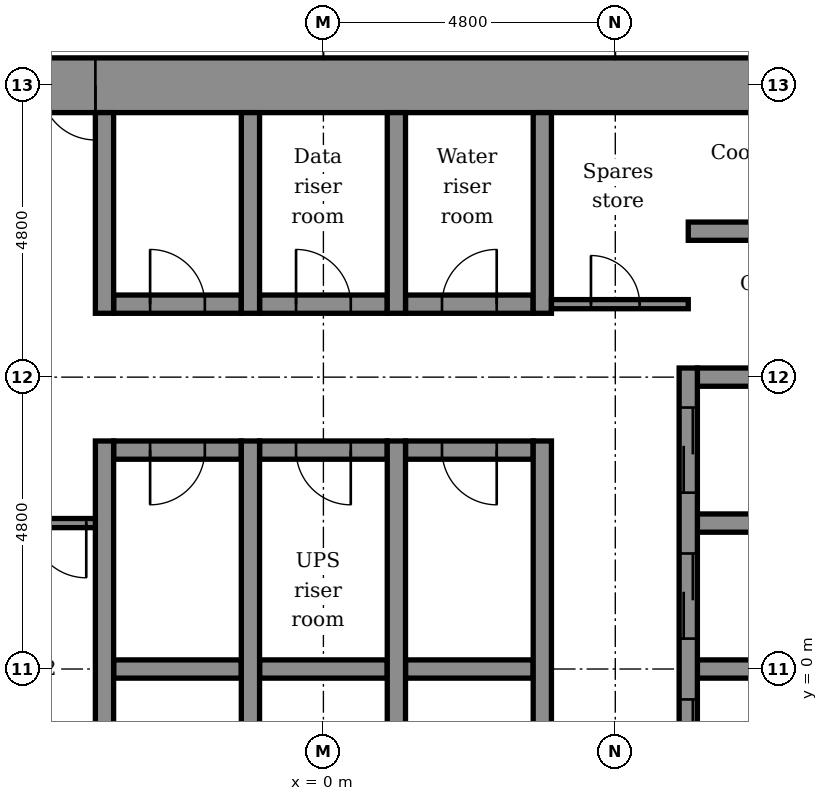
"""IFC4 building model, lengths in metres.
Left out: names, types, materials, properties, quantities, classifications, styles, units other than length and angle.
Written with IfcOpenShell. Run it as: python <this file> out.ifc"""

import sys

from ifc_helpers import new_model, si_unit, direction, frame, frame_2d, origin, place, context, subcontext, project, spatial, rectangle, extrude, element, fill, save


model = new_model("IFC4")
c1 = context("Model", 3, precision=1e-05, world=origin(), true_north=direction((0.0, 1.0)))
c2 = subcontext(c1, "Body", "Model", "MODEL_VIEW")
j1 = project(units=[si_unit("LENGTHUNIT", "METRE"), si_unit("PLANEANGLEUNIT", "RADIAN")], contexts=[c1])
p1 = place(None, origin())
s1 = spatial("IfcSite", under=j1, at=p1, CompositionType="ELEMENT")
p2 = place(p1, origin())
s2 = spatial("IfcBuilding", under=s1, at=p2, CompositionType="ELEMENT")
p3 = place(p2, frame((0.0, 0.0, 109.4)))
s3 = spatial("IfcBuildingStorey", under=s2, at=p3, CompositionType="ELEMENT", Elevation=109.4)
p4 = place(p3, frame((-3.45, 0.0, -0.2), z_axis=(0.0, 0.0, 1.0), x_axis=(1.0, 0.0, 0.0)))
e1 = element("IfcWall", 1, at=p4, inside=s3, PredefinedType="STANDARD", context=c2, shape_type="SweptSolid", body=[
    extrude(rectangle(XDim=2.1, YDim=0.3, at=frame_2d((1.05, 0.0))), origin(), (0.0, 0.0, 1.0), 4.5),
])
p5 = place(p3, frame((-1.05, 0.0, -0.2), z_axis=(0.0, 0.0, 1.0), x_axis=(1.0, 0.0, 0.0)))
e2 = element("IfcWall", 2, at=p5, inside=s3, PredefinedType="STANDARD", context=c2, shape_type="SweptSolid", body=[
    extrude(rectangle(XDim=2.1, YDim=0.3, at=frame_2d((1.05, 0.0))), origin(), (0.0, 0.0, 1.0), 4.5),
])
p6 = place(p3, frame((1.35, 0.0, -0.2), z_axis=(0.0, 0.0, 1.0), x_axis=(1.0, 0.0, 0.0)))
e3 = element("IfcWall", 3, at=p6, inside=s3, PredefinedType="STANDARD", context=c2, shape_type="SweptSolid", body=[
    extrude(rectangle(XDim=2.1, YDim=0.3, at=frame_2d((1.05, 0.0))), origin(), (0.0, 0.0, 1.0), 4.5),
])
for number, where, z_axis, x_axis in (
    (4, (6.15, 0.0, -0.2), (0.0, 0.0, 1.0), (1.0, 0.0, 0.0)),
    (5, (6.15, 2.4, -0.2), (0.0, 0.0, 1.0), (1.0, 0.0, 0.0)),
):
    element("IfcWall", number, at=place(p3, frame(where, z_axis=z_axis, x_axis=x_axis)), inside=s3, PredefinedType="STANDARD", context=c2, shape_type="SweptSolid", body=[
        extrude(rectangle(XDim=3.0, YDim=0.3, at=frame_2d((1.5, 0.0))), origin(), (0.0, 0.0, 1.0), 4.5),
    ])
p7 = place(p3, frame((-3.45, 3.6, -0.2), z_axis=(0.0, 0.0, 1.0), x_axis=(1.0, 0.0, 0.0)))
e6 = element("IfcWall", 6, at=p7, inside=s3, PredefinedType="STANDARD", context=c2, shape_type="SweptSolid", body=[
    extrude(rectangle(XDim=2.1, YDim=0.3, at=frame_2d((1.05, 0.0))), origin(), (0.0, 0.0, 1.0), 4.5),
])
p8 = place(p7, frame((0.6, 0.0, 0.2)))
e7 = element("IfcOpeningElement", 7, at=p8, cuts=e6, PredefinedType="OPENING", context=c2, shape_type="SweptSolid", body=[
    extrude(rectangle(XDim=0.9, YDim=2.1, at=frame_2d((0.45, 1.05))), frame((0.0, 0.16, 0.0), z_axis=(0.0, -1.0, 0.0), x_axis=(1.0, 0.0, 0.0)), (0.0, 0.0, 1.0), 0.32),
])
p9 = place(p3, frame((-1.05, 3.6, -0.2), z_axis=(0.0, 0.0, 1.0), x_axis=(1.0, 0.0, 0.0)))
e8 = element("IfcWall", 8, at=p9, inside=s3, PredefinedType="STANDARD", context=c2, shape_type="SweptSolid", body=[
    extrude(rectangle(XDim=2.1, YDim=0.3, at=frame_2d((1.05, 0.0))), origin(), (0.0, 0.0, 1.0), 4.5),
])
p10 = place(p9, frame((0.6, 0.0, 0.2)))
e9 = element("IfcOpeningElement", 9, at=p10, cuts=e8, PredefinedType="OPENING", context=c2, shape_type="SweptSolid", body=[
    extrude(rectangle(XDim=0.9, YDim=2.1, at=frame_2d((0.45, 1.05))), frame((0.0, 0.16, 0.0), z_axis=(0.0, -1.0, 0.0), x_axis=(1.0, 0.0, 0.0)), (0.0, 0.0, 1.0), 0.32),
])
p11 = place(p3, frame((1.35, 3.6, -0.2), z_axis=(0.0, 0.0, 1.0), x_axis=(1.0, 0.0, 0.0)))
e10 = element("IfcWall", 10, at=p11, inside=s3, PredefinedType="STANDARD", context=c2, shape_type="SweptSolid", body=[
    extrude(rectangle(XDim=2.1, YDim=0.3, at=frame_2d((1.05, 0.0))), origin(), (0.0, 0.0, 1.0), 4.5),
])
p12 = place(p11, frame((0.6, 0.0, 0.2)))
e11 = element("IfcOpeningElement", 11, at=p12, cuts=e10, PredefinedType="OPENING", context=c2, shape_type="SweptSolid", body=[
    extrude(rectangle(XDim=0.9, YDim=2.1, at=frame_2d((0.45, 1.05))), frame((0.0, 0.16, 0.0), z_axis=(0.0, -1.0, 0.0), x_axis=(1.0, 0.0, 0.0)), (0.0, 0.0, 1.0), 0.32),
])
p13 = place(p3, frame((6.15, 4.8, -0.2), z_axis=(0.0, 0.0, 1.0), x_axis=(1.0, 0.0, 0.0)))
e12 = element("IfcWall", 12, at=p13, inside=s3, PredefinedType="STANDARD", context=c2, shape_type="SweptSolid", body=[
    extrude(rectangle(XDim=3.0, YDim=0.3, at=frame_2d((1.5, 0.0))), origin(), (0.0, 0.0, 1.0), 4.5),
])
p14 = place(p3, frame((-3.45, 6.0, -0.2), z_axis=(0.0, 0.0, 1.0), x_axis=(1.0, 0.0, 0.0)))
e13 = element("IfcWall", 13, at=p14, inside=s3, PredefinedType="STANDARD", context=c2, shape_type="SweptSolid", body=[
    extrude(rectangle(XDim=2.1, YDim=0.3, at=frame_2d((1.05, 0.0))), origin(), (0.0, 0.0, 1.0), 4.5),
])
p15 = place(p14, frame((0.6, 0.0, 0.2)))
e14 = element("IfcOpeningElement", 14, at=p15, cuts=e13, PredefinedType="OPENING", context=c2, shape_type="SweptSolid", body=[
    extrude(rectangle(XDim=0.9, YDim=2.1, at=frame_2d((0.45, 1.05))), frame((0.0, 0.16, 0.0), z_axis=(0.0, -1.0, 0.0), x_axis=(1.0, 0.0, 0.0)), (0.0, 0.0, 1.0), 0.32),
])
p16 = place(p3, frame((-1.05, 6.0, -0.2), z_axis=(0.0, 0.0, 1.0), x_axis=(1.0, 0.0, 0.0)))
e15 = element("IfcWall", 15, at=p16, inside=s3, PredefinedType="STANDARD", context=c2, shape_type="SweptSolid", body=[
    extrude(rectangle(XDim=2.1, YDim=0.3, at=frame_2d((1.05, 0.0))), origin(), (0.0, 0.0, 1.0), 4.5),
])
p17 = place(p16, frame((0.6, 0.0, 0.2)))
e16 = element("IfcOpeningElement", 16, at=p17, cuts=e15, PredefinedType="OPENING", context=c2, shape_type="SweptSolid", body=[
    extrude(rectangle(XDim=0.9, YDim=2.1, at=frame_2d((0.45, 1.05))), frame((0.0, 0.16, 0.0), z_axis=(0.0, -1.0, 0.0), x_axis=(1.0, 0.0, 0.0)), (0.0, 0.0, 1.0), 0.32),
])
p18 = place(p3, frame((1.35, 6.0, -0.2), z_axis=(0.0, 0.0, 1.0), x_axis=(1.0, 0.0, 0.0)))
e17 = element("IfcWall", 17, at=p18, inside=s3, PredefinedType="STANDARD", context=c2, shape_type="SweptSolid", body=[
    extrude(rectangle(XDim=2.1, YDim=0.3, at=frame_2d((1.05, 0.0))), origin(), (0.0, 0.0, 1.0), 4.5),
])
p19 = place(p18, frame((0.6, 0.0, 0.2)))
e18 = element("IfcOpeningElement", 18, at=p19, cuts=e17, PredefinedType="OPENING", context=c2, shape_type="SweptSolid", body=[
    extrude(rectangle(XDim=0.9, YDim=2.1, at=frame_2d((0.45, 1.05))), frame((0.0, 0.16, 0.0), z_axis=(0.0, -1.0, 0.0), x_axis=(1.0, 0.0, 0.0)), (0.0, 0.0, 1.0), 0.32),
])
p20 = place(p3, frame((6.0, 7.2, -0.2), z_axis=(0.0, 0.0, 1.0), x_axis=(1.0, 0.0, 0.0)))
e19 = element("IfcWall", 19, at=p20, inside=s3, PredefinedType="STANDARD", context=c2, shape_type="SweptSolid", body=[
    extrude(rectangle(XDim=3.15, YDim=0.3, at=frame_2d((1.575, 0.0))), origin(), (0.0, 0.0, 1.0), 4.5),
])
p21 = place(p3, frame((-5.25, 9.6, -0.2), z_axis=(0.0, 0.0, 1.0), x_axis=(1.0, 0.0, 0.0)))
e20 = element("IfcWall", 20, at=p21, inside=s3, PredefinedType="SHEAR", context=c2, shape_type="SweptSolid", body=[
    extrude(rectangle(XDim=14.4, YDim=0.9, at=frame_2d((7.2, 0.0))), origin(), (0.0, 0.0, 1.0), 4.5),
])
p22 = place(p21, frame((0.6, 0.0, 0.2)))
e21 = element("IfcOpeningElement", 21, at=p22, cuts=e20, PredefinedType="OPENING", context=c2, shape_type="SweptSolid", body=[
    extrude(rectangle(XDim=0.9, YDim=2.1, at=frame_2d((0.45, 1.05))), frame((0.0, 0.46, 0.0), z_axis=(0.0, -1.0, 0.0), x_axis=(1.0, 0.0, 0.0)), (0.0, 0.0, 1.0), 0.92),
])
p23 = place(p3, frame((-3.6, -3.75, -0.2), z_axis=(0.0, 0.0, 1.0), x_axis=(0.0, 1.0, 0.0)))
e22 = element("IfcWall", 22, at=p23, inside=s3, PredefinedType="STANDARD", context=c2, shape_type="SweptSolid", body=[
    extrude(rectangle(XDim=7.5, YDim=0.3, at=frame_2d((3.75, 0.0))), origin(), (0.0, 0.0, 1.0), 4.5),
])
p24 = place(p3, frame((-3.6, 5.85, -0.2), z_axis=(0.0, 0.0, 1.0), x_axis=(0.0, 1.0, 0.0)))
e23 = element("IfcWall", 23, at=p24, inside=s3, PredefinedType="STANDARD", context=c2, shape_type="SweptSolid", body=[
    extrude(rectangle(XDim=3.3, YDim=0.3, at=frame_2d((1.65, 0.0))), origin(), (0.0, 0.0, 1.0), 4.5),
])
p25 = place(p3, frame((-1.2, -3.75, -0.2), z_axis=(0.0, 0.0, 1.0), x_axis=(0.0, 1.0, 0.0)))
e24 = element("IfcWall", 24, at=p25, inside=s3, PredefinedType="STANDARD", context=c2, shape_type="SweptSolid", body=[
    extrude(rectangle(XDim=7.5, YDim=0.3, at=frame_2d((3.75, 0.0))), origin(), (0.0, 0.0, 1.0), 4.5),
])
p26 = place(p3, frame((-1.2, 5.85, -0.2), z_axis=(0.0, 0.0, 1.0), x_axis=(0.0, 1.0, 0.0)))
e25 = element("IfcWall", 25, at=p26, inside=s3, PredefinedType="STANDARD", context=c2, shape_type="SweptSolid", body=[
    extrude(rectangle(XDim=3.3, YDim=0.3, at=frame_2d((1.65, 0.0))), origin(), (0.0, 0.0, 1.0), 4.5),
])
p27 = place(p3, frame((1.2, -3.75, -0.2), z_axis=(0.0, 0.0, 1.0), x_axis=(0.0, 1.0, 0.0)))
e26 = element("IfcWall", 26, at=p27, inside=s3, PredefinedType="STANDARD", context=c2, shape_type="SweptSolid", body=[
    extrude(rectangle(XDim=7.5, YDim=0.3, at=frame_2d((3.75, 0.0))), origin(), (0.0, 0.0, 1.0), 4.5),
])
p28 = place(p3, frame((1.2, 5.85, -0.2), z_axis=(0.0, 0.0, 1.0), x_axis=(0.0, 1.0, 0.0)))
e27 = element("IfcWall", 27, at=p28, inside=s3, PredefinedType="STANDARD", context=c2, shape_type="SweptSolid", body=[
    extrude(rectangle(XDim=3.3, YDim=0.3, at=frame_2d((1.65, 0.0))), origin(), (0.0, 0.0, 1.0), 4.5),
])
p29 = place(p3, frame((3.6, -3.75, -0.2), z_axis=(0.0, 0.0, 1.0), x_axis=(0.0, 1.0, 0.0)))
e28 = element("IfcWall", 28, at=p29, inside=s3, PredefinedType="STANDARD", context=c2, shape_type="SweptSolid", body=[
    extrude(rectangle(XDim=7.5, YDim=0.3, at=frame_2d((3.75, 0.0))), origin(), (0.0, 0.0, 1.0), 4.5),
])
p30 = place(p3, frame((3.6, 5.85, -0.2), z_axis=(0.0, 0.0, 1.0), x_axis=(0.0, 1.0, 0.0)))
e29 = element("IfcWall", 29, at=p30, inside=s3, PredefinedType="STANDARD", context=c2, shape_type="SweptSolid", body=[
    extrude(rectangle(XDim=3.3, YDim=0.3, at=frame_2d((1.65, 0.0))), origin(), (0.0, 0.0, 1.0), 4.5),
])
p31 = place(p3, frame((6.0, -2.55, -0.2), z_axis=(0.0, 0.0, 1.0), x_axis=(0.0, 1.0, 0.0)))
e30 = element("IfcWall", 30, at=p31, inside=s3, PredefinedType="STANDARD", context=c2, shape_type="SweptSolid", body=[
    extrude(rectangle(XDim=7.5, YDim=0.3, at=frame_2d((3.75, 0.0))), origin(), (0.0, 0.0, 1.0), 4.5),
])
p32 = place(p31, frame((0.65, 0.0, 0.2)))
e31 = element("IfcOpeningElement", 31, at=p32, cuts=e30, PredefinedType="OPENING", context=c2, shape_type="SweptSolid", body=[
    extrude(rectangle(XDim=1.4, YDim=2.1, at=frame_2d((0.7, 1.05))), frame((0.0, 0.16, 0.0), z_axis=(0.0, -1.0, 0.0), x_axis=(1.0, 0.0, 0.0)), (0.0, 0.0, 1.0), 0.32),
])
p33 = place(p31, frame((3.05, 0.0, 0.2)))
e32 = element("IfcOpeningElement", 32, at=p33, cuts=e30, PredefinedType="OPENING", context=c2, shape_type="SweptSolid", body=[
    extrude(rectangle(XDim=1.4, YDim=2.1, at=frame_2d((0.7, 1.05))), frame((0.0, 0.16, 0.0), z_axis=(0.0, -1.0, 0.0), x_axis=(1.0, 0.0, 0.0)), (0.0, 0.0, 1.0), 0.32),
])
p34 = place(p31, frame((5.45, 0.0, 0.2)))
e33 = element("IfcOpeningElement", 33, at=p34, cuts=e30, PredefinedType="OPENING", context=c2, shape_type="SweptSolid", body=[
    extrude(rectangle(XDim=1.4, YDim=2.1, at=frame_2d((0.7, 1.05))), frame((0.0, 0.16, 0.0), z_axis=(0.0, -1.0, 0.0), x_axis=(1.0, 0.0, 0.0)), (0.0, 0.0, 1.0), 0.32),
])
p35 = place(p3, frame((3.75, 6.0, 0.0), z_axis=(0.0, 0.0, 1.0), x_axis=(1.0, 0.0, 0.0)))
e34 = element("IfcWall", 34, at=p35, inside=s3, PredefinedType="PARTITIONING", context=c2, shape_type="SweptSolid", body=[
    extrude(rectangle(XDim=2.25, YDim=0.15, at=frame_2d((1.125, 0.0))), origin(), (0.0, 0.0, 1.0), 4.3),
])
p36 = place(p35, frame((0.65, 0.0, 0.0)))
e35 = element("IfcOpeningElement", 35, at=p36, cuts=e34, PredefinedType="OPENING", context=c2, shape_type="SweptSolid", body=[
    extrude(rectangle(XDim=0.8, YDim=2.1, at=frame_2d((0.4, 1.05))), frame((0.0, 0.085, 0.0), z_axis=(0.0, -1.0, 0.0), x_axis=(1.0, 0.0, 0.0)), (0.0, 0.0, 1.0), 0.17),
])
p37 = place(p3, frame((-4.95, 2.4, 0.0), z_axis=(0.0, 0.0, 1.0), x_axis=(1.0, 0.0, 0.0)))
e36 = element("IfcWall", 36, at=p37, inside=s3, PredefinedType="PARTITIONING", context=c2, shape_type="SweptSolid", body=[
    extrude(rectangle(XDim=1.2, YDim=0.15, at=frame_2d((0.6, 0.0))), origin(), (0.0, 0.0, 1.0), 4.3),
])
p38 = place(p37, frame((0.15, 0.0, 0.0)))
e37 = element("IfcOpeningElement", 37, at=p38, cuts=e36, PredefinedType="OPENING", context=c2, shape_type="SweptSolid", body=[
    extrude(rectangle(XDim=0.9, YDim=2.1, at=frame_2d((0.45, 1.05))), frame((0.0, 0.085, 0.0), z_axis=(0.0, -1.0, 0.0), x_axis=(1.0, 0.0, 0.0)), (0.0, 0.0, 1.0), 0.17),
])
p39 = place(p36, origin())
e38 = element("IfcDoor", 38, at=p39, inside=s3, OperationType="SINGLE_SWING_LEFT", PredefinedType="DOOR", context=c2, shape_type="SweptSolid", body=[
    extrude(rectangle(XDim=0.8, YDim=2.1, at=frame_2d((0.4, 1.05))), frame((0.0, 0.025, 0.0), z_axis=(0.0, -1.0, 0.0), x_axis=(1.0, 0.0, 0.0)), (0.0, 0.0, 1.0), 0.05),
])
fill(e35, e38)
p40 = place(p32, origin())
e39 = element("IfcDoor", 39, at=p40, inside=s3, OperationType="DOUBLE_DOOR_SLIDING", PredefinedType="DOOR", context=c2, shape_type="SweptSolid", body=[
    extrude(rectangle(XDim=1.4, YDim=2.1, at=frame_2d((0.7, 1.05))), frame((0.0, 0.025, 0.0), z_axis=(0.0, -1.0, 0.0), x_axis=(1.0, 0.0, 0.0)), (0.0, 0.0, 1.0), 0.05),
])
fill(e31, e39)
p41 = place(p33, origin())
e40 = element("IfcDoor", 40, at=p41, inside=s3, OperationType="DOUBLE_DOOR_SLIDING", PredefinedType="DOOR", context=c2, shape_type="SweptSolid", body=[
    extrude(rectangle(XDim=1.4, YDim=2.1, at=frame_2d((0.7, 1.05))), frame((0.0, 0.025, 0.0), z_axis=(0.0, -1.0, 0.0), x_axis=(1.0, 0.0, 0.0)), (0.0, 0.0, 1.0), 0.05),
])
fill(e32, e40)
p42 = place(p34, origin())
e41 = element("IfcDoor", 41, at=p42, inside=s3, OperationType="DOUBLE_DOOR_SLIDING", PredefinedType="DOOR", context=c2, shape_type="SweptSolid", body=[
    extrude(rectangle(XDim=1.4, YDim=2.1, at=frame_2d((0.7, 1.05))), frame((0.0, 0.025, 0.0), z_axis=(0.0, -1.0, 0.0), x_axis=(1.0, 0.0, 0.0)), (0.0, 0.0, 1.0), 0.05),
])
fill(e33, e41)
p43 = place(p15, origin())
e42 = element("IfcDoor", 42, at=p43, inside=s3, OperationType="SINGLE_SWING_LEFT", PredefinedType="DOOR", context=c2, shape_type="SweptSolid", body=[
    extrude(rectangle(XDim=0.9, YDim=2.1, at=frame_2d((0.45, 1.05))), frame((0.0, 0.025, 0.0), z_axis=(0.0, -1.0, 0.0), x_axis=(1.0, 0.0, 0.0)), (0.0, 0.0, 1.0), 0.05),
])
fill(e14, e42)
p44 = place(p17, origin())
e43 = element("IfcDoor", 43, at=p44, inside=s3, OperationType="SINGLE_SWING_LEFT", PredefinedType="DOOR", context=c2, shape_type="SweptSolid", body=[
    extrude(rectangle(XDim=0.9, YDim=2.1, at=frame_2d((0.45, 1.05))), frame((0.0, 0.025, 0.0), z_axis=(0.0, -1.0, 0.0), x_axis=(1.0, 0.0, 0.0)), (0.0, 0.0, 1.0), 0.05),
])
fill(e16, e43)
p45 = place(p19, origin())
e44 = element("IfcDoor", 44, at=p45, inside=s3, OperationType="SINGLE_SWING_RIGHT", PredefinedType="DOOR", context=c2, shape_type="SweptSolid", body=[
    extrude(rectangle(XDim=0.9, YDim=2.1, at=frame_2d((0.45, 1.05))), frame((0.0, 0.025, 0.0), z_axis=(0.0, -1.0, 0.0), x_axis=(1.0, 0.0, 0.0)), (0.0, 0.0, 1.0), 0.05),
])
fill(e18, e44)
p46 = place(p8, frame((0.9, 0.0, 0.0), z_axis=(0.0, 0.0, 1.0), x_axis=(-1.0, 0.0, 0.0)))
e45 = element("IfcDoor", 45, at=p46, inside=s3, OperationType="SINGLE_SWING_LEFT", PredefinedType="DOOR", context=c2, shape_type="SweptSolid", body=[
    extrude(rectangle(XDim=0.9, YDim=2.1, at=frame_2d((0.45, 1.05))), frame((0.0, 0.025, 0.0), z_axis=(0.0, -1.0, 0.0), x_axis=(1.0, 0.0, 0.0)), (0.0, 0.0, 1.0), 0.05),
])
fill(e7, e45)
p47 = place(p10, frame((0.9, 0.0, 0.0), z_axis=(0.0, 0.0, 1.0), x_axis=(-1.0, 0.0, 0.0)))
e46 = element("IfcDoor", 46, at=p47, inside=s3, OperationType="SINGLE_SWING_RIGHT", PredefinedType="DOOR", context=c2, shape_type="SweptSolid", body=[
    extrude(rectangle(XDim=0.9, YDim=2.1, at=frame_2d((0.45, 1.05))), frame((0.0, 0.025, 0.0), z_axis=(0.0, -1.0, 0.0), x_axis=(1.0, 0.0, 0.0)), (0.0, 0.0, 1.0), 0.05),
])
fill(e9, e46)
p48 = place(p12, frame((0.9, 0.0, 0.0), z_axis=(0.0, 0.0, 1.0), x_axis=(-1.0, 0.0, 0.0)))
e47 = element("IfcDoor", 47, at=p48, inside=s3, OperationType="SINGLE_SWING_RIGHT", PredefinedType="DOOR", context=c2, shape_type="SweptSolid", body=[
    extrude(rectangle(XDim=0.9, YDim=2.1, at=frame_2d((0.45, 1.05))), frame((0.0, 0.025, 0.0), z_axis=(0.0, -1.0, 0.0), x_axis=(1.0, 0.0, 0.0)), (0.0, 0.0, 1.0), 0.05),
])
fill(e11, e47)
p49 = place(p22, frame((0.9, 0.0, 0.0), z_axis=(0.0, 0.0, 1.0), x_axis=(-1.0, 0.0, 0.0)))
e48 = element("IfcDoor", 48, at=p49, inside=s3, OperationType="SINGLE_SWING_RIGHT", PredefinedType="DOOR", context=c2, shape_type="SweptSolid", body=[
    extrude(rectangle(XDim=0.9, YDim=2.1, at=frame_2d((0.45, 1.05))), frame((0.0, 0.025, 0.0), z_axis=(0.0, -1.0, 0.0), x_axis=(1.0, 0.0, 0.0)), (0.0, 0.0, 1.0), 0.05),
])
fill(e21, e48)
p50 = place(p38, frame((0.9, 0.0, 0.0), z_axis=(0.0, 0.0, 1.0), x_axis=(-1.0, 0.0, 0.0)))
e49 = element("IfcDoor", 49, at=p50, inside=s3, OperationType="SINGLE_SWING_RIGHT", PredefinedType="DOOR", context=c2, shape_type="SweptSolid", body=[
    extrude(rectangle(XDim=0.9, YDim=2.1, at=frame_2d((0.45, 1.05))), frame((0.0, 0.025, 0.0), z_axis=(0.0, -1.0, 0.0), x_axis=(1.0, 0.0, 0.0)), (0.0, 0.0, 1.0), 0.05),
])
fill(e37, e49)
save(model, sys.argv[1])
